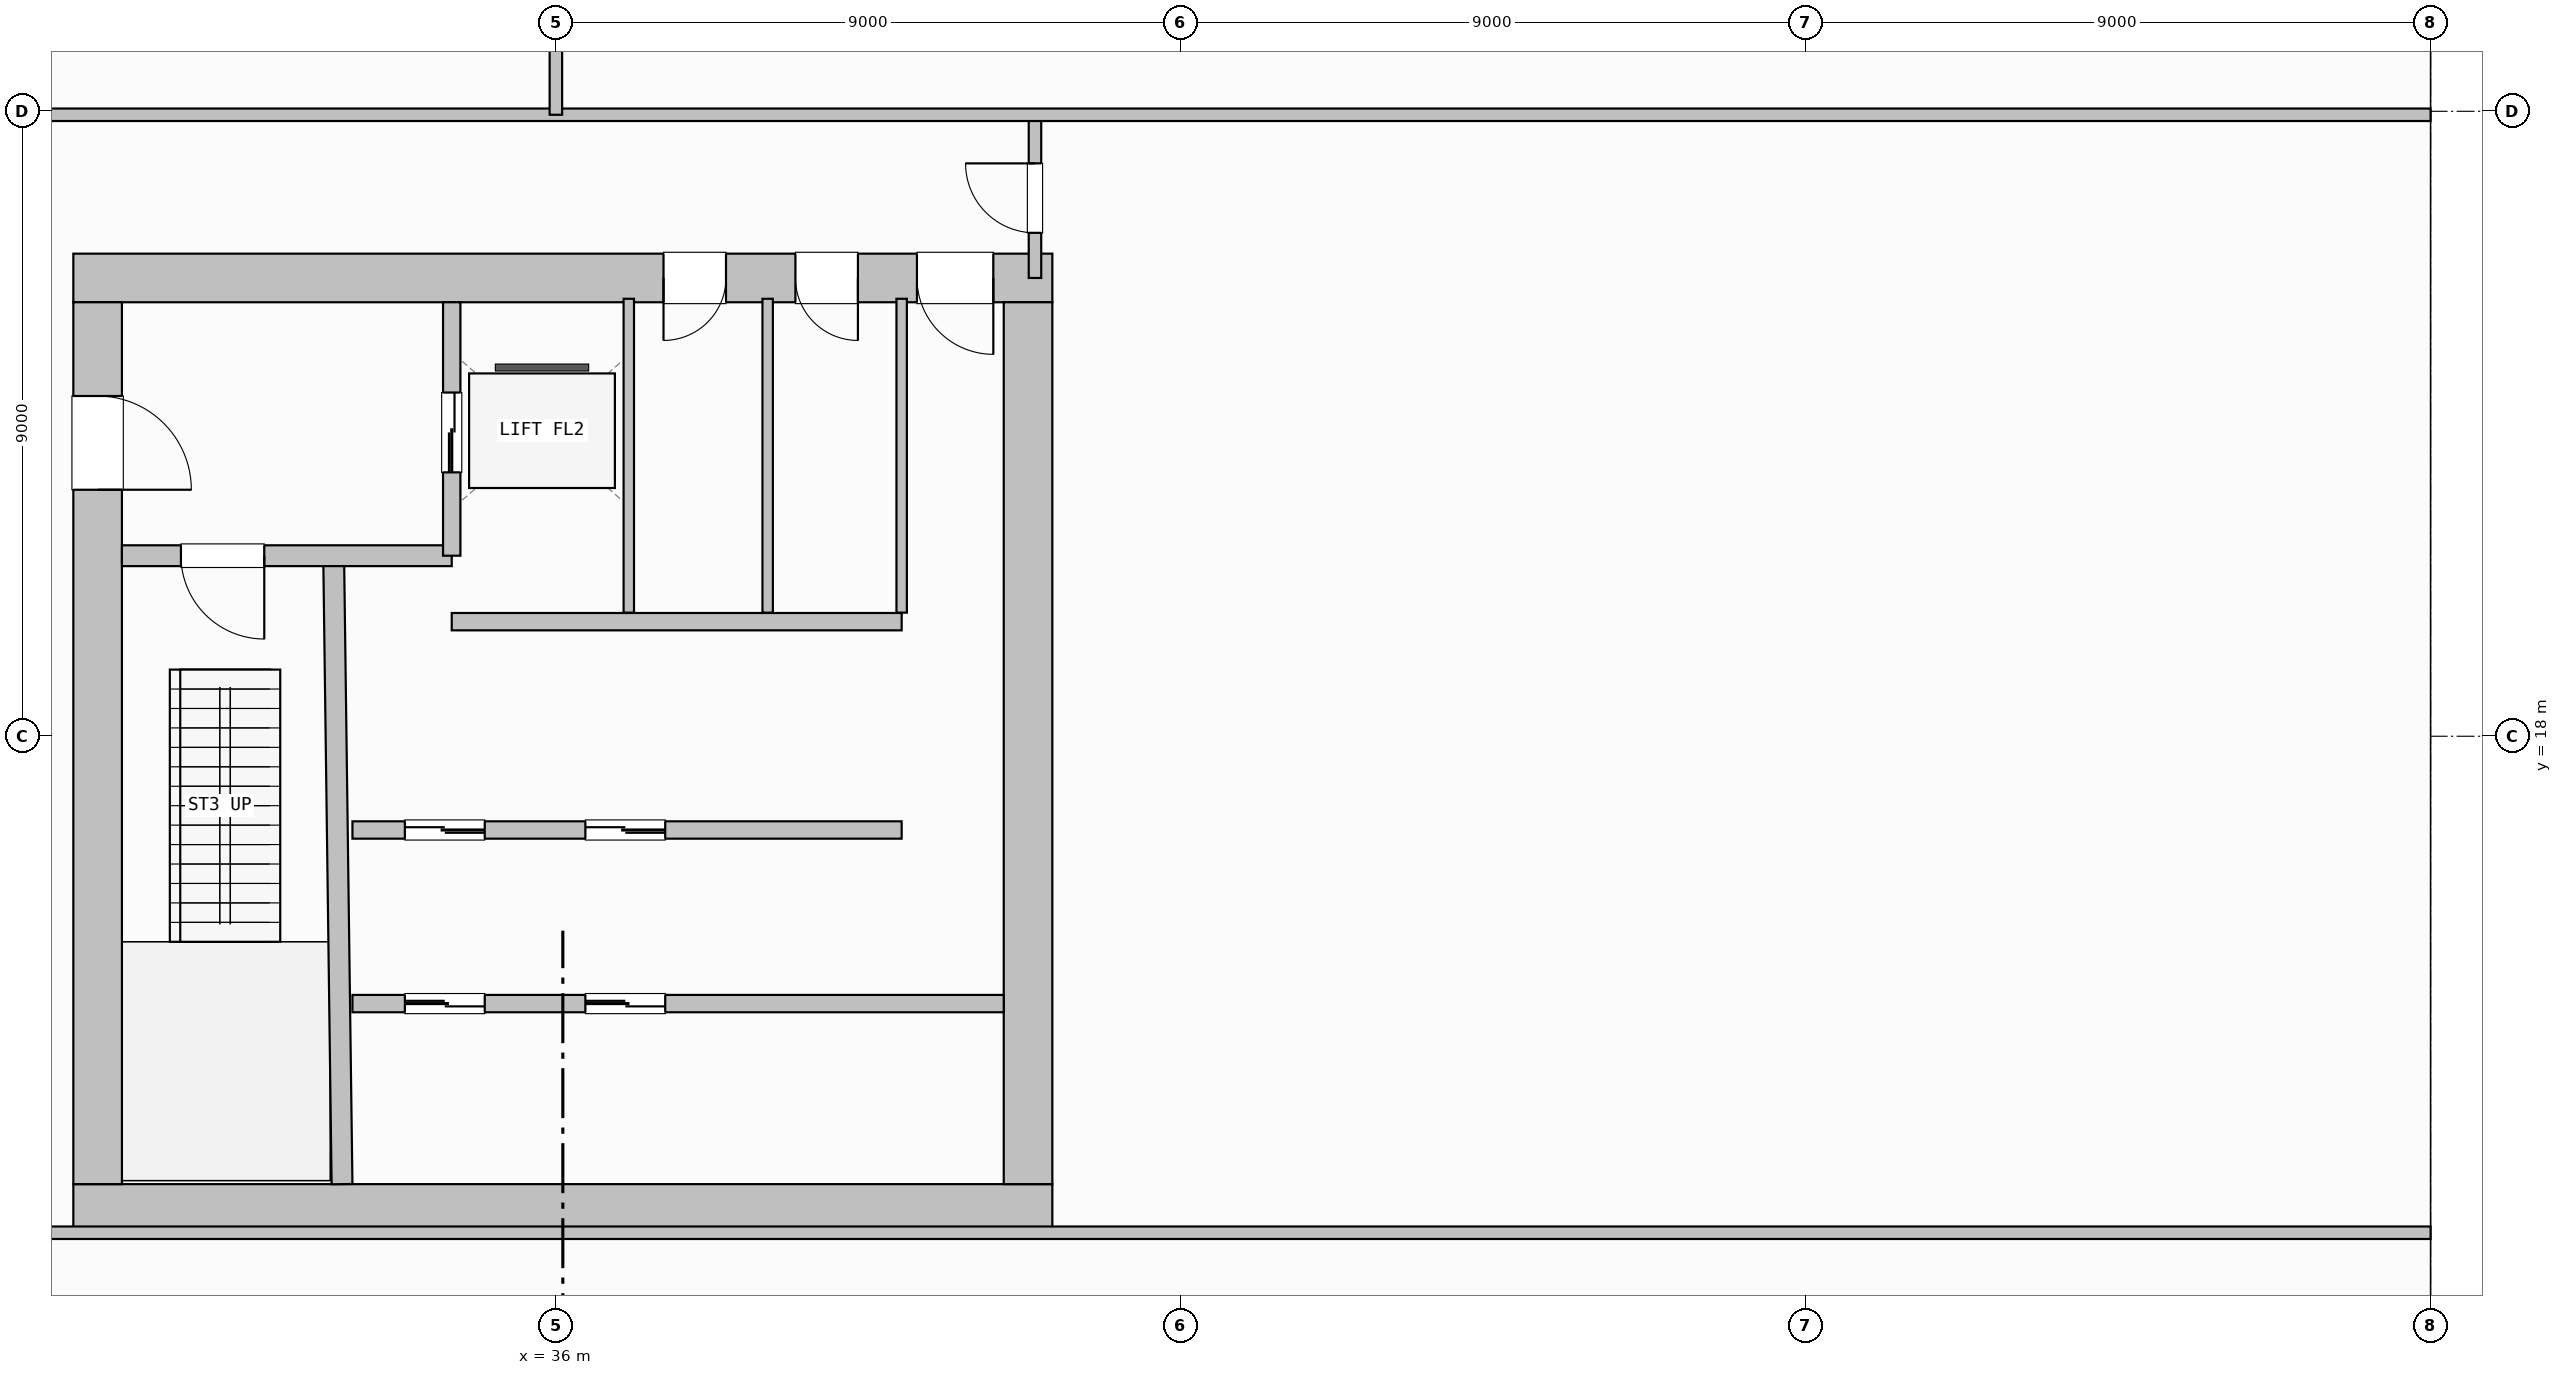
"""IFC4 building model, lengths in metres.
Left out: names, types, materials, properties, quantities, classifications, styles, units other than length and angle.
Written with IfcOpenShell. Run it as: python <this file> out.ifc"""

import sys

from ifc_helpers import new_model, si_unit, direction, frame, frame_2d, origin, origin_2d, place, context, subcontext, project, spatial, rectangle, i_section, extrude, element, fill, save


model = new_model("IFC4")
c1 = context("Model", 3, precision=1e-05, world=origin(), true_north=direction((0.0, 1.0)))
c2 = subcontext(c1, "Body", "Model", "MODEL_VIEW")
j1 = project(units=[si_unit("LENGTHUNIT", "METRE"), si_unit("PLANEANGLEUNIT", "RADIAN")], contexts=[c1])
p1 = place(None, origin())
s1 = spatial("IfcSite", under=j1, at=p1, CompositionType="ELEMENT")
p2 = place(p1, origin())
s2 = spatial("IfcBuilding", under=s1, at=p2, CompositionType="ELEMENT")
p3 = place(p2, frame((0.0, 0.0, 11.0)))
s3 = spatial("IfcBuildingStorey", under=s2, at=p3, CompositionType="ELEMENT", Elevation=11.0)
for number, where, z_axis, x_axis in (
    (1, (36.0, 27.0, 0.0), (0.0, 0.0, 1.0), (1.0, 0.0, 0.0)),
    (2, (45.0, 18.0, 0.0), (0.0, 0.0, 1.0), (1.0, 0.0, 0.0)),
    (3, (45.0, 27.0, 0.0), (0.0, 0.0, 1.0), (1.0, 0.0, 0.0)),
    (4, (54.0, 18.0, 0.0), (0.0, 0.0, 1.0), (1.0, 0.0, 0.0)),
    (5, (54.0, 27.0, 0.0), (0.0, 0.0, 1.0), (1.0, 0.0, 0.0)),
    (6, (63.0, 18.0, 0.0), (0.0, 0.0, 1.0), (1.0, 0.0, 0.0)),
    (7, (63.0, 27.0, 0.0), (0.0, 0.0, 1.0), (1.0, 0.0, 0.0)),
):
    element("IfcColumn", number, at=place(p3, frame(where, z_axis=z_axis, x_axis=x_axis)), inside=s3, PredefinedType="COLUMN", context=c2, shape_type="SweptSolid", body=[
        extrude(i_section(OverallWidth=0.442, OverallDepth=0.531, WebThickness=0.066, FlangeThickness=0.106, FilletRadius=0.015, at=origin_2d()), origin(), (0.0, 0.0, 1.0), 5.2),
    ])
p4 = place(p3, frame((29.05, 11.2, 0.0), z_axis=(0.0, 0.0, 1.0), x_axis=(1.0, 0.0, 0.0)))
e8 = element("IfcWall", 8, at=p4, inside=s3, PredefinedType="SHEAR", context=c2, shape_type="SweptSolid", body=[
    extrude(rectangle(XDim=14.1, YDim=0.7, at=frame_2d((7.05, 0.0))), origin(), (0.0, 0.0, 1.0), 4.88),
])
p5 = place(p3, frame((43.15, 24.6, 0.0), z_axis=(0.0, 0.0, 1.0), x_axis=(-1.0, 0.0, 0.0)))
e9 = element("IfcWall", 9, at=p5, inside=s3, PredefinedType="SHEAR", context=c2, shape_type="SweptSolid", body=[
    extrude(rectangle(XDim=14.1, YDim=0.7, at=frame_2d((7.05, 0.0))), origin(), (0.0, 0.0, 1.0), 4.88),
])
p6 = place(p5, frame((0.85, 0.0, 0.0)))
e10 = element("IfcOpeningElement", 10, at=p6, cuts=e9, PredefinedType="OPENING", context=c2, shape_type="SweptSolid", body=[
    extrude(rectangle(XDim=1.1, YDim=2.15, at=frame_2d((0.55, 1.075))), frame((0.0, 0.36, 0.0), z_axis=(0.0, -1.0, 0.0), x_axis=(1.0, 0.0, 0.0)), (0.0, 0.0, 1.0), 0.72),
])
p7 = place(p5, frame((2.8, 0.0, 0.0)))
e11 = element("IfcOpeningElement", 11, at=p7, cuts=e9, PredefinedType="OPENING", context=c2, shape_type="SweptSolid", body=[
    extrude(rectangle(XDim=0.9, YDim=2.1, at=frame_2d((0.45, 1.05))), frame((0.0, 0.36, 0.0), z_axis=(0.0, -1.0, 0.0), x_axis=(1.0, 0.0, 0.0)), (0.0, 0.0, 1.0), 0.72),
])
p8 = place(p5, frame((4.7, 0.0, 0.0)))
e12 = element("IfcOpeningElement", 12, at=p8, cuts=e9, PredefinedType="OPENING", context=c2, shape_type="SweptSolid", body=[
    extrude(rectangle(XDim=0.9, YDim=2.1, at=frame_2d((0.45, 1.05))), frame((0.0, 0.36, 0.0), z_axis=(0.0, -1.0, 0.0), x_axis=(1.0, 0.0, 0.0)), (0.0, 0.0, 1.0), 0.72),
])
p9 = place(p3, frame((29.4, 24.25, 0.0), z_axis=(0.0, 0.0, 1.0), x_axis=(0.0, -1.0, 0.0)))
e13 = element("IfcWall", 13, at=p9, inside=s3, PredefinedType="SHEAR", context=c2, shape_type="SweptSolid", body=[
    extrude(rectangle(XDim=12.7, YDim=0.7, at=frame_2d((6.35, 0.0))), origin(), (0.0, 0.0, 1.0), 4.88),
])
p10 = place(p9, frame((1.35, 0.0, 0.0)))
e14 = element("IfcOpeningElement", 14, at=p10, cuts=e13, PredefinedType="OPENING", context=c2, shape_type="SweptSolid", body=[
    extrude(rectangle(XDim=1.35, YDim=2.15, at=frame_2d((0.675, 1.075))), frame((0.0, 0.36, 0.0), z_axis=(0.0, -1.0, 0.0), x_axis=(1.0, 0.0, 0.0)), (0.0, 0.0, 1.0), 0.72),
])
p11 = place(p3, frame((42.8, 11.55, 0.0), z_axis=(0.0, 0.0, 1.0), x_axis=(0.0, 1.0, 0.0)))
e15 = element("IfcWall", 15, at=p11, inside=s3, PredefinedType="SHEAR", context=c2, shape_type="SweptSolid", body=[
    extrude(rectangle(XDim=12.7, YDim=0.7, at=frame_2d((6.35, 0.0))), origin(), (0.0, 0.0, 1.0), 4.88),
])
p12 = place(p3, frame((32.92, 11.55, 0.0), z_axis=(0.0, 0.0, 1.0), x_axis=(-0.01331804616, 0.99991131089, 0.0)))
e16 = element("IfcWall", 16, at=p12, inside=s3, PredefinedType="SHEAR", context=c2, shape_type="SweptSolid", body=[
    extrude(rectangle(XDim=9.001, YDim=0.3, at=frame_2d((4.5, 0.0))), origin(), (0.0, 0.0, 1.0), 4.88),
])
p13 = place(p3, frame((34.5, 20.6, 0.0), z_axis=(0.0, 0.0, 1.0), x_axis=(-1.0, 0.0, 0.0)))
e17 = element("IfcWall", 17, at=p13, inside=s3, PredefinedType="SHEAR", context=c2, shape_type="SweptSolid", body=[
    extrude(rectangle(XDim=4.75, YDim=0.3, at=frame_2d((2.375, 0.0))), origin(), (0.0, 0.0, 1.0), 4.88),
])
p14 = place(p13, frame((2.7, 0.0, 0.0)))
e18 = element("IfcOpeningElement", 18, at=p14, cuts=e17, PredefinedType="OPENING", context=c2, shape_type="SweptSolid", body=[
    extrude(rectangle(XDim=1.2, YDim=2.15, at=frame_2d((0.6, 1.075))), frame((0.0, 0.16, 0.0), z_axis=(0.0, -1.0, 0.0), x_axis=(1.0, 0.0, 0.0)), (0.0, 0.0, 1.0), 0.32),
])
p15 = place(p3, frame((34.5, 20.6, 0.0), z_axis=(0.0, 0.0, 1.0), x_axis=(0.0, 1.0, 0.0)))
e19 = element("IfcWall", 19, at=p15, inside=s3, PredefinedType="PARTITIONING", context=c2, shape_type="SweptSolid", body=[
    extrude(rectangle(XDim=3.65, YDim=0.25, at=frame_2d((1.825, 0.0))), origin(), (0.0, 0.0, 1.0), 4.88),
])
p16 = place(p15, frame((1.2, 0.0, 0.0)))
e20 = element("IfcOpeningElement", 20, at=p16, cuts=e19, PredefinedType="OPENING", context=c2, shape_type="SweptSolid", body=[
    extrude(rectangle(XDim=1.15, YDim=2.15, at=frame_2d((0.575, 1.075))), frame((0.0, 0.135, 0.0), z_axis=(0.0, -1.0, 0.0), x_axis=(1.0, 0.0, 0.0)), (0.0, 0.0, 1.0), 0.27),
])
p17 = place(p3, frame((34.5, 19.65, 0.0), z_axis=(0.0, 0.0, 1.0), x_axis=(1.0, 0.0, 0.0)))
e21 = element("IfcWall", 21, at=p17, inside=s3, PredefinedType="PARTITIONING", context=c2, shape_type="SweptSolid", body=[
    extrude(rectangle(XDim=6.48, YDim=0.25, at=frame_2d((3.24, 0.0))), origin(), (0.0, 0.0, 1.0), 4.88),
])
p18 = place(p3, frame((33.07, 14.15, 0.0), z_axis=(0.0, 0.0, 1.0), x_axis=(1.0, 0.0, 0.0)))
e22 = element("IfcWall", 22, at=p18, inside=s3, PredefinedType="PARTITIONING", context=c2, shape_type="SweptSolid", body=[
    extrude(rectangle(XDim=9.38, YDim=0.25, at=frame_2d((4.69, 0.0))), origin(), (0.0, 0.0, 1.0), 4.88),
])
p19 = place(p18, frame((0.755, 0.0, 0.0)))
e23 = element("IfcOpeningElement", 23, at=p19, cuts=e22, PredefinedType="OPENING", context=c2, shape_type="SweptSolid", body=[
    extrude(rectangle(XDim=1.15, YDim=2.15, at=frame_2d((0.575, 1.075))), frame((0.0, 0.135, 0.0), z_axis=(0.0, -1.0, 0.0), x_axis=(1.0, 0.0, 0.0)), (0.0, 0.0, 1.0), 0.27),
])
p20 = place(p18, frame((3.355, 0.0, 0.0)))
e24 = element("IfcOpeningElement", 24, at=p20, cuts=e22, PredefinedType="OPENING", context=c2, shape_type="SweptSolid", body=[
    extrude(rectangle(XDim=1.15, YDim=2.15, at=frame_2d((0.575, 1.075))), frame((0.0, 0.135, 0.0), z_axis=(0.0, -1.0, 0.0), x_axis=(1.0, 0.0, 0.0)), (0.0, 0.0, 1.0), 0.27),
])
p21 = place(p3, frame((40.98, 16.65, 0.0), z_axis=(0.0, 0.0, 1.0), x_axis=(-1.0, 0.0, 0.0)))
e25 = element("IfcWall", 25, at=p21, inside=s3, PredefinedType="PARTITIONING", context=c2, shape_type="SweptSolid", body=[
    extrude(rectangle(XDim=7.91, YDim=0.25, at=frame_2d((3.955, 0.0))), origin(), (0.0, 0.0, 1.0), 4.88),
])
p22 = place(p21, frame((6.005, 0.0, 0.0)))
e26 = element("IfcOpeningElement", 26, at=p22, cuts=e25, PredefinedType="OPENING", context=c2, shape_type="SweptSolid", body=[
    extrude(rectangle(XDim=1.15, YDim=2.15, at=frame_2d((0.575, 1.075))), frame((0.0, 0.135, 0.0), z_axis=(0.0, -1.0, 0.0), x_axis=(1.0, 0.0, 0.0)), (0.0, 0.0, 1.0), 0.27),
])
p23 = place(p21, frame((3.405, 0.0, 0.0)))
e27 = element("IfcOpeningElement", 27, at=p23, cuts=e25, PredefinedType="OPENING", context=c2, shape_type="SweptSolid", body=[
    extrude(rectangle(XDim=1.15, YDim=2.15, at=frame_2d((0.575, 1.075))), frame((0.0, 0.135, 0.0), z_axis=(0.0, -1.0, 0.0), x_axis=(1.0, 0.0, 0.0)), (0.0, 0.0, 1.0), 0.27),
])
for number, where, z_axis, x_axis in (
    (28, (37.05, 19.78, 0.0), (0.0, 0.0, 1.0), (0.0, 1.0, 0.0)),
    (29, (39.05, 19.78, 0.0), (0.0, 0.0, 1.0), (0.0, 1.0, 0.0)),
    (30, (40.98, 19.78, 0.0), (0.0, 0.0, 1.0), (0.0, 1.0, 0.0)),
):
    element("IfcWall", number, at=place(p3, frame(where, z_axis=z_axis, x_axis=x_axis)), inside=s3, PredefinedType="PARTITIONING", context=c2, shape_type="SweptSolid", body=[
        extrude(rectangle(XDim=4.52, YDim=0.15, at=frame_2d((2.26, 0.0))), origin(), (0.0, 0.0, 1.0), 4.88),
    ])
p24 = place(p3, frame((24.65, 10.85, 0.0), z_axis=(0.0, 0.0, 1.0), x_axis=(1.0, 0.0, 0.0)))
e31 = element("IfcWall", 31, at=p24, inside=s3, PredefinedType="PARTITIONING", context=c2, shape_type="SweptSolid", body=[
    extrude(rectangle(XDim=38.35, YDim=0.18, at=frame_2d((19.175, 0.0))), origin(), (0.0, 0.0, 1.0), 4.005),
])
p25 = place(p24, frame((2.0, 0.0, 0.0)))
e32 = element("IfcOpeningElement", 32, at=p25, cuts=e31, PredefinedType="OPENING", context=c2, shape_type="SweptSolid", body=[
    extrude(rectangle(XDim=1.2, YDim=2.15, at=frame_2d((0.6, 1.075))), frame((0.0, 0.1, 0.0), z_axis=(0.0, -1.0, 0.0), x_axis=(1.0, 0.0, 0.0)), (0.0, 0.0, 1.0), 0.2),
])
p26 = place(p3, frame((42.9, 24.6, 0.0), z_axis=(0.0, 0.0, 1.0), x_axis=(0.0, 1.0, 0.0)))
e33 = element("IfcWall", 33, at=p26, inside=s3, PredefinedType="PARTITIONING", context=c2, shape_type="SweptSolid", body=[
    extrude(rectangle(XDim=2.35, YDim=0.18, at=frame_2d((1.175, 0.0))), origin(), (0.0, 0.0, 1.0), 3.933),
])
p27 = place(p26, frame((0.65, 0.0, 0.0)))
e34 = element("IfcOpeningElement", 34, at=p27, cuts=e33, PredefinedType="OPENING", context=c2, shape_type="SweptSolid", body=[
    extrude(rectangle(XDim=1.0, YDim=2.1, at=frame_2d((0.5, 1.05))), frame((0.0, 0.1, 0.0), z_axis=(0.0, -1.0, 0.0), x_axis=(1.0, 0.0, 0.0)), (0.0, 0.0, 1.0), 0.2),
])
p28 = place(p3, frame((27.1, 26.95, 0.0), z_axis=(0.0, 0.0, 1.0), x_axis=(1.0, 0.0, 0.0)))
e35 = element("IfcWall", 35, at=p28, inside=s3, PredefinedType="PARTITIONING", context=c2, shape_type="SweptSolid", body=[
    extrude(rectangle(XDim=35.9, YDim=0.18, at=frame_2d((17.95, 0.0))), origin(), (0.0, 0.0, 1.0), 3.933),
])
p29 = place(p3, frame((36.0, 26.95, 0.0), z_axis=(0.0, 0.0, 1.0), x_axis=(0.0, 1.0, 0.0)))
e36 = element("IfcWall", 36, at=p29, inside=s3, PredefinedType="PARTITIONING", context=c2, shape_type="SweptSolid", body=[
    extrude(rectangle(XDim=27.05, YDim=0.18, at=frame_2d((13.525, 0.0))), origin(), (0.0, 0.0, 1.0), 3.933),
])
p30 = place(p29, frame((4.5, 0.0, 0.0)))
e37 = element("IfcOpeningElement", 37, at=p30, cuts=e36, PredefinedType="OPENING", context=c2, shape_type="SweptSolid", body=[
    extrude(rectangle(XDim=0.86, YDim=2.05, at=frame_2d((0.43, 1.025))), frame((0.0, 0.1, 0.0), z_axis=(0.0, -1.0, 0.0), x_axis=(1.0, 0.0, 0.0)), (0.0, 0.0, 1.0), 0.2),
])
p31 = place(p14, origin())
e38 = element("IfcDoor", 38, at=p31, inside=s3, OperationType="SINGLE_SWING_LEFT", PredefinedType="DOOR", context=c2, shape_type="SweptSolid", body=[
    extrude(rectangle(XDim=1.2, YDim=2.15, at=frame_2d((0.6, 1.075))), frame((0.0, 0.025, 0.0), z_axis=(0.0, -1.0, 0.0), x_axis=(1.0, 0.0, 0.0)), (0.0, 0.0, 1.0), 0.05),
])
fill(e18, e38)
p32 = place(p10, origin())
e39 = element("IfcDoor", 39, at=p32, inside=s3, OperationType="SINGLE_SWING_RIGHT", PredefinedType="DOOR", context=c2, shape_type="SweptSolid", body=[
    extrude(rectangle(XDim=1.35, YDim=2.15, at=frame_2d((0.675, 1.075))), frame((0.0, 0.025, 0.0), z_axis=(0.0, -1.0, 0.0), x_axis=(1.0, 0.0, 0.0)), (0.0, 0.0, 1.0), 0.05),
])
fill(e14, e39)
p33 = place(p6, origin())
e40 = element("IfcDoor", 40, at=p33, inside=s3, OperationType="SINGLE_SWING_LEFT", PredefinedType="DOOR", context=c2, shape_type="SweptSolid", body=[
    extrude(rectangle(XDim=1.1, YDim=2.15, at=frame_2d((0.55, 1.075))), frame((0.0, 0.025, 0.0), z_axis=(0.0, -1.0, 0.0), x_axis=(1.0, 0.0, 0.0)), (0.0, 0.0, 1.0), 0.05),
])
fill(e10, e40)
p34 = place(p7, origin())
e41 = element("IfcDoor", 41, at=p34, inside=s3, OperationType="SINGLE_SWING_LEFT", PredefinedType="DOOR", context=c2, shape_type="SweptSolid", body=[
    extrude(rectangle(XDim=0.9, YDim=2.1, at=frame_2d((0.45, 1.05))), frame((0.0, 0.025, 0.0), z_axis=(0.0, -1.0, 0.0), x_axis=(1.0, 0.0, 0.0)), (0.0, 0.0, 1.0), 0.05),
])
fill(e11, e41)
p35 = place(p8, origin())
e42 = element("IfcDoor", 42, at=p35, inside=s3, OperationType="SINGLE_SWING_RIGHT", PredefinedType="DOOR", context=c2, shape_type="SweptSolid", body=[
    extrude(rectangle(XDim=0.9, YDim=2.1, at=frame_2d((0.45, 1.05))), frame((0.0, 0.025, 0.0), z_axis=(0.0, -1.0, 0.0), x_axis=(1.0, 0.0, 0.0)), (0.0, 0.0, 1.0), 0.05),
])
fill(e12, e42)
p36 = place(p16, origin())
e43 = element("IfcDoor", 43, at=p36, inside=s3, OperationType="DOUBLE_DOOR_SLIDING", PredefinedType="DOOR", context=c2, shape_type="SweptSolid", body=[
    extrude(rectangle(XDim=1.15, YDim=2.15, at=frame_2d((0.575, 1.075))), frame((0.0, 0.025, 0.0), z_axis=(0.0, -1.0, 0.0), x_axis=(1.0, 0.0, 0.0)), (0.0, 0.0, 1.0), 0.05),
])
fill(e20, e43)
p37 = place(p19, origin())
e44 = element("IfcDoor", 44, at=p37, inside=s3, OperationType="DOUBLE_DOOR_SLIDING", PredefinedType="DOOR", context=c2, shape_type="SweptSolid", body=[
    extrude(rectangle(XDim=1.15, YDim=2.15, at=frame_2d((0.575, 1.075))), frame((0.0, 0.025, 0.0), z_axis=(0.0, -1.0, 0.0), x_axis=(1.0, 0.0, 0.0)), (0.0, 0.0, 1.0), 0.05),
])
fill(e23, e44)
p38 = place(p20, origin())
e45 = element("IfcDoor", 45, at=p38, inside=s3, OperationType="DOUBLE_DOOR_SLIDING", PredefinedType="DOOR", context=c2, shape_type="SweptSolid", body=[
    extrude(rectangle(XDim=1.15, YDim=2.15, at=frame_2d((0.575, 1.075))), frame((0.0, 0.025, 0.0), z_axis=(0.0, -1.0, 0.0), x_axis=(1.0, 0.0, 0.0)), (0.0, 0.0, 1.0), 0.05),
])
fill(e24, e45)
p39 = place(p22, origin())
e46 = element("IfcDoor", 46, at=p39, inside=s3, OperationType="DOUBLE_DOOR_SLIDING", PredefinedType="DOOR", context=c2, shape_type="SweptSolid", body=[
    extrude(rectangle(XDim=1.15, YDim=2.15, at=frame_2d((0.575, 1.075))), frame((0.0, 0.025, 0.0), z_axis=(0.0, -1.0, 0.0), x_axis=(1.0, 0.0, 0.0)), (0.0, 0.0, 1.0), 0.05),
])
fill(e26, e46)
p40 = place(p23, origin())
e47 = element("IfcDoor", 47, at=p40, inside=s3, OperationType="DOUBLE_DOOR_SLIDING", PredefinedType="DOOR", context=c2, shape_type="SweptSolid", body=[
    extrude(rectangle(XDim=1.15, YDim=2.15, at=frame_2d((0.575, 1.075))), frame((0.0, 0.025, 0.0), z_axis=(0.0, -1.0, 0.0), x_axis=(1.0, 0.0, 0.0)), (0.0, 0.0, 1.0), 0.05),
])
fill(e27, e47)
p41 = place(p27, origin())
e48 = element("IfcDoor", 48, at=p41, inside=s3, OperationType="SINGLE_SWING_RIGHT", PredefinedType="DOOR", context=c2, shape_type="SweptSolid", body=[
    extrude(rectangle(XDim=1.0, YDim=2.1, at=frame_2d((0.5, 1.05))), frame((0.0, 0.025, 0.0), z_axis=(0.0, -1.0, 0.0), x_axis=(1.0, 0.0, 0.0)), (0.0, 0.0, 1.0), 0.05),
])
fill(e34, e48)
save(model, sys.argv[1])
